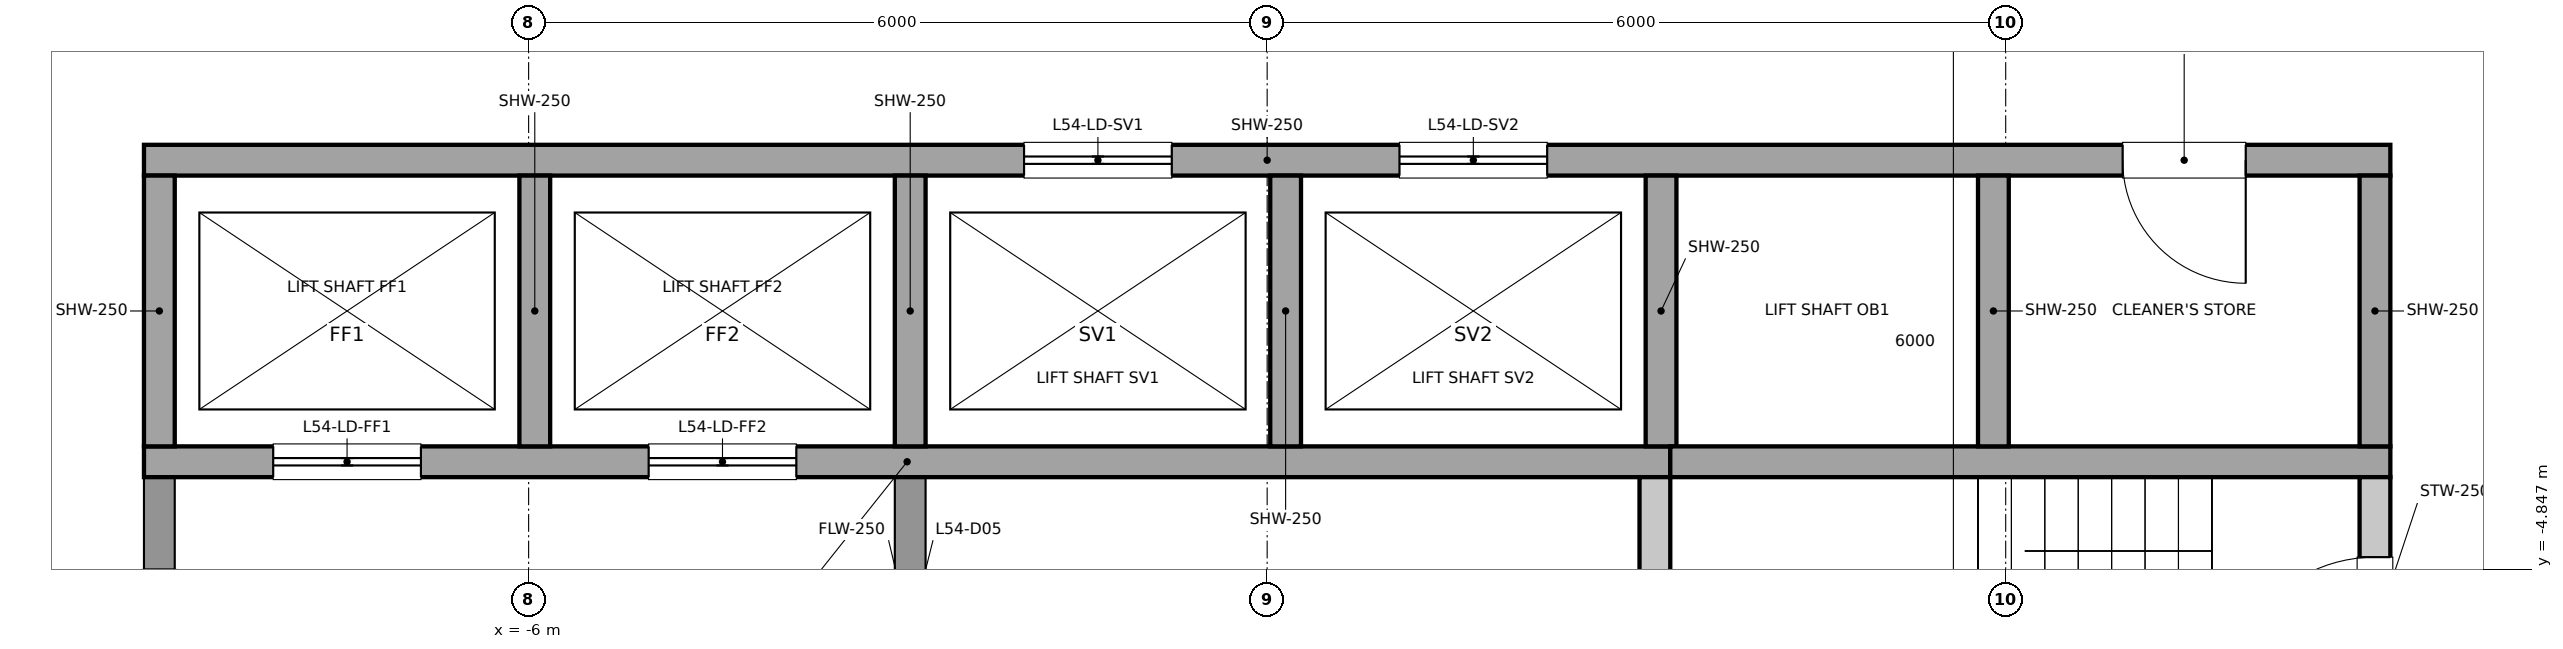
"""IFC4 building model, lengths in metres.
Left out: names, types, materials, properties, quantities, classifications, styles, units other than length and angle.
Written with IfcOpenShell. Run it as: python <this file> out.ifc"""

import sys

from ifc_helpers import new_model, si_unit, direction, frame, frame_2d, origin, place, context, subcontext, project, spatial, rectangle, extrude, element, fill, save


model = new_model("IFC4")
c1 = context("Model", 3, precision=1e-05, world=origin(), true_north=direction((0.0, 1.0)))
c2 = subcontext(c1, "Body", "Model", "MODEL_VIEW")
j1 = project(units=[si_unit("LENGTHUNIT", "METRE"), si_unit("PLANEANGLEUNIT", "RADIAN")], contexts=[c1])
p1 = place(None, origin())
s1 = spatial("IfcSite", under=j1, at=p1, CompositionType="ELEMENT")
p2 = place(p1, origin())
s2 = spatial("IfcBuilding", under=s1, at=p2, CompositionType="ELEMENT")
p3 = place(p2, frame((0.0, 0.0, 249.6)))
s3 = spatial("IfcBuildingStorey", under=s2, at=p3, CompositionType="ELEMENT", Elevation=249.6)
p4 = place(p3, frame((9.0, -6.6, 0.0), z_axis=(0.0, 0.0, 1.0), x_axis=(0.0, 1.0, 0.0)))
e1 = element("IfcWall", 1, at=p4, inside=s3, PredefinedType="SOLIDWALL", context=c2, shape_type="SweptSolid", body=[
    extrude(rectangle(XDim=2.5, YDim=0.25, at=frame_2d((1.25, 0.0))), origin(), (0.0, 0.0, 1.0), 5.25),
])
p5 = place(p4, frame((0.65, 0.0, 0.0)))
e2 = element("IfcOpeningElement", 2, at=p5, cuts=e1, PredefinedType="OPENING", context=c2, shape_type="SweptSolid", body=[
    extrude(rectangle(XDim=1.2, YDim=2.1, at=frame_2d((0.6, 1.05))), frame((0.0, 0.125, 0.0), z_axis=(0.0, -1.0, 0.0), x_axis=(1.0, 0.0, 0.0)), (0.0, 0.0, 1.0), 0.25),
])
p6 = place(p3, frame((-9.0, -6.6, 0.0), z_axis=(0.0, 0.0, 1.0), x_axis=(0.0, 1.0, 0.0)))
e3 = element("IfcWall", 3, at=p6, inside=s3, PredefinedType="PARTITIONING", context=c2, shape_type="SweptSolid", body=[
    extrude(rectangle(XDim=2.5, YDim=0.25, at=frame_2d((1.25, 0.0))), origin(), (0.0, 0.0, 1.0), 5.25),
])
p7 = place(p6, frame((0.75, 0.0, 0.0)))
e4 = element("IfcOpeningElement", 4, at=p7, cuts=e3, PredefinedType="OPENING", context=c2, shape_type="SweptSolid", body=[
    extrude(rectangle(XDim=1.0, YDim=2.1, at=frame_2d((0.5, 1.05))), frame((0.0, 0.125, 0.0), z_axis=(0.0, -1.0, 0.0), x_axis=(1.0, 0.0, 0.0)), (0.0, 0.0, 1.0), 0.25),
])
p8 = place(p3, frame((3.15, -6.6, 0.0), z_axis=(0.0, 0.0, 1.0), x_axis=(0.0, 1.0, 0.0)))
e5 = element("IfcWall", 5, at=p8, inside=s3, PredefinedType="SOLIDWALL", context=c2, shape_type="SweptSolid", body=[
    extrude(rectangle(XDim=2.5, YDim=0.25, at=frame_2d((1.25, 0.0))), origin(), (0.0, 0.0, 1.0), 5.25),
])
p9 = place(p3, frame((-2.9, -6.6, 0.0), z_axis=(0.0, 0.0, 1.0), x_axis=(0.0, 1.0, 0.0)))
e6 = element("IfcWall", 6, at=p9, inside=s3, PredefinedType="PARTITIONING", context=c2, shape_type="SweptSolid", body=[
    extrude(rectangle(XDim=2.5, YDim=0.25, at=frame_2d((1.25, 0.0))), origin(), (0.0, 0.0, 1.0), 5.25),
])
p10 = place(p9, frame((0.8, 0.0, 0.0)))
e7 = element("IfcOpeningElement", 7, at=p10, cuts=e6, PredefinedType="OPENING", context=c2, shape_type="SweptSolid", body=[
    extrude(rectangle(XDim=0.9, YDim=2.1, at=frame_2d((0.45, 1.05))), frame((0.0, 0.125, 0.0), z_axis=(0.0, -1.0, 0.0), x_axis=(1.0, 0.0, 0.0)), (0.0, 0.0, 1.0), 0.25),
])
p11 = place(p3, frame((-9.125, -1.525, 0.0), z_axis=(0.0, 0.0, 1.0), x_axis=(1.0, 0.0, 0.0)))
e8 = element("IfcWall", 8, at=p11, inside=s3, PredefinedType="SOLIDWALL", context=c2, shape_type="SweptSolid", body=[
    extrude(rectangle(XDim=18.25, YDim=0.25, at=frame_2d((9.125, 0.0))), origin(), (0.0, 0.0, 1.0), 5.25),
])
p12 = place(p11, frame((7.15, 0.0, 0.0)))
e9 = element("IfcOpeningElement", 9, at=p12, cuts=e8, PredefinedType="OPENING", context=c2, shape_type="SweptSolid", body=[
    extrude(rectangle(XDim=1.2, YDim=2.1, at=frame_2d((0.6, 1.05))), frame((0.0, 0.125, 0.0), z_axis=(0.0, -1.0, 0.0), x_axis=(1.0, 0.0, 0.0)), (0.0, 0.0, 1.0), 0.25),
])
p13 = place(p11, frame((10.2, 0.0, 0.0)))
e10 = element("IfcOpeningElement", 10, at=p13, cuts=e8, PredefinedType="OPENING", context=c2, shape_type="SweptSolid", body=[
    extrude(rectangle(XDim=1.2, YDim=2.1, at=frame_2d((0.6, 1.05))), frame((0.0, 0.125, 0.0), z_axis=(0.0, -1.0, 0.0), x_axis=(1.0, 0.0, 0.0)), (0.0, 0.0, 1.0), 0.25),
])
p14 = place(p11, frame((16.075, 0.0, 0.0)))
e11 = element("IfcOpeningElement", 11, at=p14, cuts=e8, PredefinedType="OPENING", context=c2, shape_type="SweptSolid", body=[
    extrude(rectangle(XDim=1.0, YDim=2.1, at=frame_2d((0.5, 1.05))), frame((0.0, 0.125, 0.0), z_axis=(0.0, -1.0, 0.0), x_axis=(1.0, 0.0, 0.0)), (0.0, 0.0, 1.0), 0.25),
])
p15 = place(p3, frame((-9.125, -3.975, 0.0), z_axis=(0.0, 0.0, 1.0), x_axis=(1.0, 0.0, 0.0)))
e12 = element("IfcWall", 12, at=p15, inside=s3, PredefinedType="SOLIDWALL", context=c2, shape_type="SweptSolid", body=[
    extrude(rectangle(XDim=12.4, YDim=0.25, at=frame_2d((6.2, 0.0))), origin(), (0.0, 0.0, 1.0), 5.25),
])
p16 = place(p15, frame((1.05, 0.0, 0.0)))
e13 = element("IfcOpeningElement", 13, at=p16, cuts=e12, PredefinedType="OPENING", context=c2, shape_type="SweptSolid", body=[
    extrude(rectangle(XDim=1.2, YDim=2.1, at=frame_2d((0.6, 1.05))), frame((0.0, 0.125, 0.0), z_axis=(0.0, -1.0, 0.0), x_axis=(1.0, 0.0, 0.0)), (0.0, 0.0, 1.0), 0.25),
])
p17 = place(p15, frame((4.1, 0.0, 0.0)))
e14 = element("IfcOpeningElement", 14, at=p17, cuts=e12, PredefinedType="OPENING", context=c2, shape_type="SweptSolid", body=[
    extrude(rectangle(XDim=1.2, YDim=2.1, at=frame_2d((0.6, 1.05))), frame((0.0, 0.125, 0.0), z_axis=(0.0, -1.0, 0.0), x_axis=(1.0, 0.0, 0.0)), (0.0, 0.0, 1.0), 0.25),
])
p18 = place(p3, frame((3.275, -3.975, 0.0), z_axis=(0.0, 0.0, 1.0), x_axis=(1.0, 0.0, 0.0)))
e15 = element("IfcWall", 15, at=p18, inside=s3, PredefinedType="SOLIDWALL", context=c2, shape_type="SweptSolid", body=[
    extrude(rectangle(XDim=5.85, YDim=0.25, at=frame_2d((2.925, 0.0))), origin(), (0.0, 0.0, 1.0), 5.25),
])
for number, where, z_axis, x_axis in (
    (16, (-9.0, -3.85, 0.0), (0.0, 0.0, 1.0), (0.0, 1.0, 0.0)),
    (17, (-5.95, -3.85, 0.0), (0.0, 0.0, 1.0), (0.0, 1.0, 0.0)),
    (18, (-2.9, -3.85, 0.0), (0.0, 0.0, 1.0), (0.0, 1.0, 0.0)),
    (19, (0.15, -3.85, 0.0), (0.0, 0.0, 1.0), (0.0, 1.0, 0.0)),
    (20, (3.2, -3.85, 0.0), (0.0, 0.0, 1.0), (0.0, 1.0, 0.0)),
    (21, (5.9, -3.85, 0.0), (0.0, 0.0, 1.0), (0.0, 1.0, 0.0)),
    (22, (9.0, -3.85, 0.0), (0.0, 0.0, 1.0), (0.0, 1.0, 0.0)),
):
    element("IfcWall", number, at=place(p3, frame(where, z_axis=z_axis, x_axis=x_axis)), inside=s3, PredefinedType="SOLIDWALL", context=c2, shape_type="SweptSolid", body=[
        extrude(rectangle(XDim=2.2, YDim=0.25, at=frame_2d((1.1, 0.0))), origin(), (0.0, 0.0, 1.0), 5.25),
    ])
p19 = place(p16, origin())
e23 = element("IfcDoor", 23, at=p19, inside=s3, OperationType="DOUBLE_DOOR_SLIDING", PredefinedType="DOOR", context=c2, shape_type="SweptSolid", body=[
    extrude(rectangle(XDim=1.2, YDim=2.1, at=frame_2d((0.6, 1.05))), frame((0.0, 0.025, 0.0), z_axis=(0.0, -1.0, 0.0), x_axis=(1.0, 0.0, 0.0)), (0.0, 0.0, 1.0), 0.05),
])
fill(e13, e23)
p20 = place(p17, origin())
e24 = element("IfcDoor", 24, at=p20, inside=s3, OperationType="DOUBLE_DOOR_SLIDING", PredefinedType="DOOR", context=c2, shape_type="SweptSolid", body=[
    extrude(rectangle(XDim=1.2, YDim=2.1, at=frame_2d((0.6, 1.05))), frame((0.0, 0.025, 0.0), z_axis=(0.0, -1.0, 0.0), x_axis=(1.0, 0.0, 0.0)), (0.0, 0.0, 1.0), 0.05),
])
fill(e14, e24)
p21 = place(p12, origin())
e25 = element("IfcDoor", 25, at=p21, inside=s3, OperationType="DOUBLE_DOOR_SLIDING", PredefinedType="DOOR", context=c2, shape_type="SweptSolid", body=[
    extrude(rectangle(XDim=1.2, YDim=2.1, at=frame_2d((0.6, 1.05))), frame((0.0, 0.025, 0.0), z_axis=(0.0, -1.0, 0.0), x_axis=(1.0, 0.0, 0.0)), (0.0, 0.0, 1.0), 0.05),
])
fill(e9, e25)
p22 = place(p13, origin())
e26 = element("IfcDoor", 26, at=p22, inside=s3, OperationType="DOUBLE_DOOR_SLIDING", PredefinedType="DOOR", context=c2, shape_type="SweptSolid", body=[
    extrude(rectangle(XDim=1.2, YDim=2.1, at=frame_2d((0.6, 1.05))), frame((0.0, 0.025, 0.0), z_axis=(0.0, -1.0, 0.0), x_axis=(1.0, 0.0, 0.0)), (0.0, 0.0, 1.0), 0.05),
])
fill(e10, e26)
p23 = place(p5, origin())
e27 = element("IfcDoor", 27, at=p23, inside=s3, OperationType="SINGLE_SWING_LEFT", PredefinedType="DOOR", context=c2, shape_type="SweptSolid", body=[
    extrude(rectangle(XDim=1.2, YDim=2.1, at=frame_2d((0.6, 1.05))), frame((0.0, 0.025, 0.0), z_axis=(0.0, -1.0, 0.0), x_axis=(1.0, 0.0, 0.0)), (0.0, 0.0, 1.0), 0.05),
])
fill(e2, e27)
p24 = place(p14, origin())
e28 = element("IfcDoor", 28, at=p24, inside=s3, OperationType="SINGLE_SWING_RIGHT", PredefinedType="DOOR", context=c2, shape_type="SweptSolid", body=[
    extrude(rectangle(XDim=1.0, YDim=2.1, at=frame_2d((0.5, 1.05))), frame((0.0, 0.025, 0.0), z_axis=(0.0, -1.0, 0.0), x_axis=(1.0, 0.0, 0.0)), (0.0, 0.0, 1.0), 0.05),
])
fill(e11, e28)
save(model, sys.argv[1])
